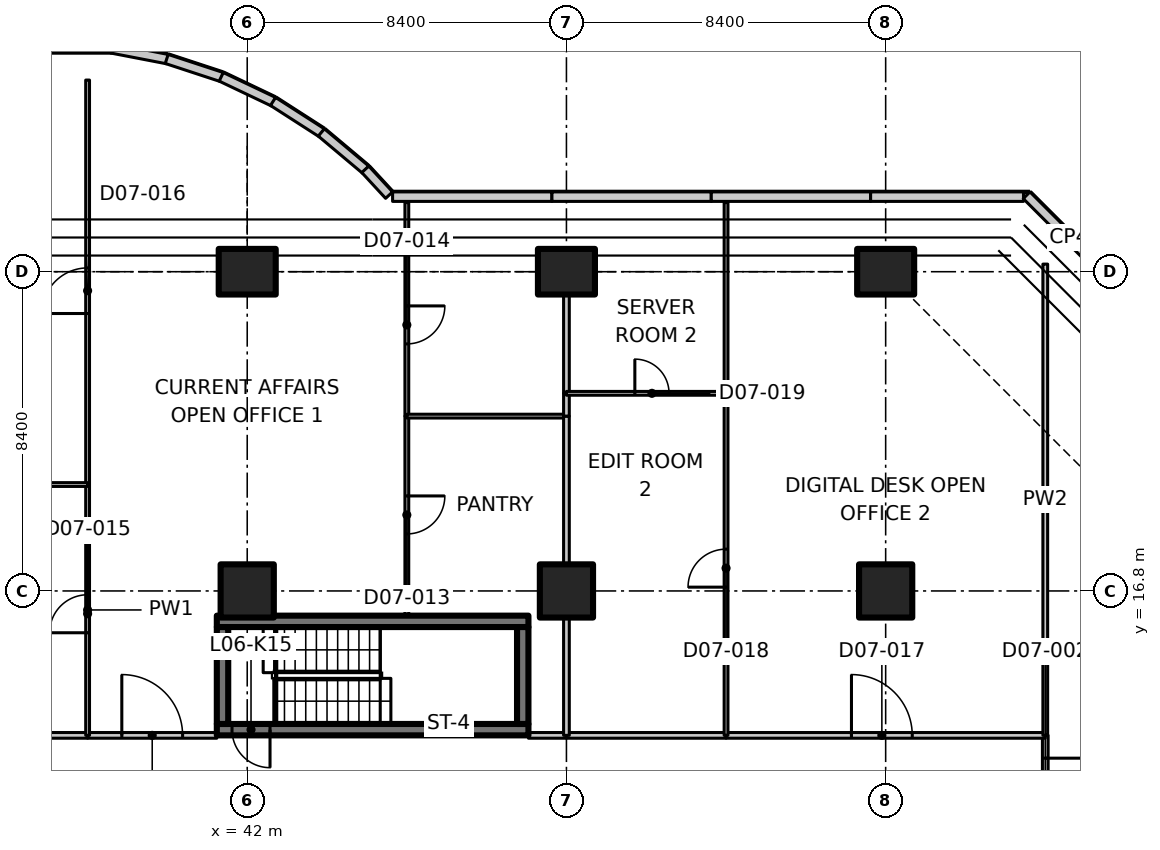
"""IFC4 building model, lengths in metres.
Left out: names, types, materials, properties, quantities, classifications, styles, units other than length and angle.
Written with IfcOpenShell. Run it as: python <this file> out.ifc"""

import sys

from ifc_helpers import new_model, si_unit, direction, frame, frame_2d, origin, origin_2d, place, context, subcontext, project, spatial, polyline, rectangle, outline, extrude, element, fill, save


model = new_model("IFC4")
c1 = context("Model", 3, precision=1e-05, world=origin(), true_north=direction((0.0, 1.0)))
c2 = subcontext(c1, "Body", "Model", "MODEL_VIEW")
j1 = project(units=[si_unit("LENGTHUNIT", "METRE"), si_unit("PLANEANGLEUNIT", "RADIAN")], contexts=[c1])
p1 = place(None, origin())
s1 = spatial("IfcSite", under=j1, at=p1, CompositionType="ELEMENT")
p2 = place(p1, origin())
s2 = spatial("IfcBuilding", under=s1, at=p2, CompositionType="ELEMENT")
p3 = place(p2, frame((0.0, 0.0, 36.5)))
s3 = spatial("IfcBuildingStorey", under=s2, at=p3, CompositionType="ELEMENT", Elevation=36.5)
p4 = place(p3, frame((42.0, 16.8, 0.0), z_axis=(0.0, 0.0, 1.0), x_axis=(1.0, 0.0, 0.0)))
e1 = element("IfcColumn", 1, at=p4, inside=s3, PredefinedType="COLUMN", context=c2, shape_type="SweptSolid", body=[
    extrude(rectangle(XDim=1.4, YDim=1.4, at=origin_2d()), origin(), (0.0, 0.0, 1.0), 3.35),
])
p5 = place(p3, frame((42.0, 25.2, 0.0), z_axis=(0.0, 0.0, 1.0), x_axis=(0.0, 1.0, 0.0)))
e2 = element("IfcColumn", 2, at=p5, inside=s3, PredefinedType="COLUMN", context=c2, shape_type="SweptSolid", body=[
    extrude(rectangle(XDim=1.2, YDim=1.5, at=origin_2d()), origin(), (0.0, 0.0, 1.0), 3.35),
])
p6 = place(p3, frame((50.4, 16.8, 0.0), z_axis=(0.0, 0.0, 1.0), x_axis=(1.0, 0.0, 0.0)))
e3 = element("IfcColumn", 3, at=p6, inside=s3, PredefinedType="COLUMN", context=c2, shape_type="SweptSolid", body=[
    extrude(rectangle(XDim=1.4, YDim=1.4, at=origin_2d()), origin(), (0.0, 0.0, 1.0), 3.35),
])
p7 = place(p3, frame((50.4, 25.2, 0.0), z_axis=(0.0, 0.0, 1.0), x_axis=(0.0, 1.0, 0.0)))
e4 = element("IfcColumn", 4, at=p7, inside=s3, PredefinedType="COLUMN", context=c2, shape_type="SweptSolid", body=[
    extrude(rectangle(XDim=1.2, YDim=1.5, at=origin_2d()), origin(), (0.0, 0.0, 1.0), 3.35),
])
p8 = place(p3, frame((58.8, 16.8, 0.0), z_axis=(0.0, 0.0, 1.0), x_axis=(1.0, 0.0, 0.0)))
e5 = element("IfcColumn", 5, at=p8, inside=s3, PredefinedType="COLUMN", context=c2, shape_type="SweptSolid", body=[
    extrude(rectangle(XDim=1.4, YDim=1.4, at=origin_2d()), origin(), (0.0, 0.0, 1.0), 3.35),
])
p9 = place(p3, frame((58.8, 25.2, 0.0), z_axis=(0.0, 0.0, 1.0), x_axis=(0.0, 1.0, 0.0)))
e6 = element("IfcColumn", 6, at=p9, inside=s3, PredefinedType="COLUMN", context=c2, shape_type="SweptSolid", body=[
    extrude(rectangle(XDim=1.2, YDim=1.5, at=origin_2d()), origin(), (0.0, 0.0, 1.0), 3.35),
])
p10 = place(p3, frame((35.348, 31.075, 0.0), z_axis=(0.0, 0.0, 1.0), x_axis=(1.0, 0.0, 0.0)))
e7 = element("IfcWall", 7, at=p10, inside=s3, PredefinedType="PARAPET", context=c2, shape_type="SweptSolid", body=[
    extrude(rectangle(XDim=3.103, YDim=0.25, at=frame_2d((1.552, 0.0))), origin(), (0.0, 0.0, 1.0), 1.1),
])
p11 = place(p3, frame((38.428, 31.077, 0.0), z_axis=(0.0, 0.0, 1.0), x_axis=(0.981913193778, -0.189331666354, 0.0)))
e8 = element("IfcWall", 8, at=p11, inside=s3, PredefinedType="PARAPET", context=c2, shape_type="SweptSolid", body=[
    extrude(rectangle(XDim=1.496, YDim=0.25, at=frame_2d((0.748, 0.0))), origin(), (0.0, 0.0, 1.0), 1.1),
])
for number, where, z_axis, x_axis in (
    (9, (39.881, 30.798, 0.0), (0.0, 0.0, 1.0), (0.95, -0.312, 0.0)),
    (10, (41.316, 30.328, 0.0), (0.0, 0.0, 1.0), (0.903, -0.43, 0.0)),
    (11, (42.679, 29.68, 0.0), (0.0, 0.0, 1.0), (0.841, -0.541, 0.0)),
    (12, (43.95, 28.864, 0.0), (0.0, 0.0, 1.0), (0.766, -0.643, 0.0)),
):
    element("IfcWall", number, at=place(p3, frame(where, z_axis=z_axis, x_axis=x_axis)), inside=s3, PredefinedType="PARAPET", context=c2, shape_type="SweptSolid", body=[
        extrude(rectangle(XDim=1.526, YDim=0.25, at=frame_2d((0.763, 0.0))), origin(), (0.0, 0.0, 1.0), 1.1),
    ])
p12 = place(p3, frame((45.107, 27.894, 0.0), z_axis=(0.0, 0.0, 1.0), x_axis=(0.678126420741, -0.734945275168, 0.0)))
e13 = element("IfcWall", 13, at=p12, inside=s3, PredefinedType="PARAPET", context=c2, shape_type="SweptSolid", body=[
    extrude(rectangle(XDim=0.924, YDim=0.25, at=frame_2d((0.462, 0.0))), origin(), (0.0, 0.0, 1.0), 1.1),
])
for number, where, z_axis, x_axis in (
    (14, (45.825, 27.175, 0.0), (0.0, 0.0, 1.0), (1.0, 0.0, 0.0)),
    (15, (50.018, 27.175, 0.0), (0.0, 0.0, 1.0), (1.0, 0.0, 0.0)),
    (16, (54.211, 27.175, 0.0), (0.0, 0.0, 1.0), (1.0, 0.0, 0.0)),
):
    element("IfcWall", number, at=place(p3, frame(where, z_axis=z_axis, x_axis=x_axis)), inside=s3, PredefinedType="PARAPET", context=c2, shape_type="SweptSolid", body=[
        extrude(rectangle(XDim=4.193, YDim=0.25, at=frame_2d((2.096, 0.0))), origin(), (0.0, 0.0, 1.0), 1.1),
    ])
p13 = place(p3, frame((58.404, 27.175, 0.0), z_axis=(0.0, 0.0, 1.0), x_axis=(1.0, 0.0, 0.0)))
e17 = element("IfcWall", 17, at=p13, inside=s3, PredefinedType="PARAPET", context=c2, shape_type="SweptSolid", body=[
    extrude(rectangle(XDim=4.023, YDim=0.25, at=frame_2d((2.011, 0.0))), origin(), (0.0, 0.0, 1.0), 1.1),
])
p14 = place(p3, frame((62.509, 27.212, 0.0), z_axis=(0.0, 0.0, 1.0), x_axis=(0.70706814675, -0.707145413513, 0.0)))
e18 = element("IfcWall", 18, at=p14, inside=s3, PredefinedType="PARAPET", context=c2, shape_type="SweptSolid", body=[
    extrude(rectangle(XDim=3.16, YDim=0.25, at=frame_2d((1.58, 0.0))), origin(), (0.0, 0.0, 1.0), 1.1),
])
p15 = place(p3, frame((49.4, 13.15, 0.0), z_axis=(0.0, 0.0, 1.0), x_axis=(-1.0, 0.0, 0.0)))
e19 = element("IfcWall", 19, at=p15, inside=s3, PredefinedType="SHEAR", context=c2, shape_type="SweptSolid", body=[
    extrude(rectangle(XDim=8.2, YDim=0.3, at=frame_2d((4.1, 0.0))), origin(), (0.0, 0.0, 1.0), 3.35),
])
p16 = place(p15, frame((6.8, 0.0, 0.0)))
e20 = element("IfcOpeningElement", 20, at=p16, cuts=e19, PredefinedType="OPENING", context=c2, shape_type="SweptSolid", body=[
    extrude(rectangle(XDim=1.0, YDim=2.1, at=frame_2d((0.5, 1.05))), frame((0.0, 0.16, 0.0), z_axis=(0.0, -1.0, 0.0), x_axis=(1.0, 0.0, 0.0)), (0.0, 0.0, 1.0), 0.32),
])
p17 = place(p3, frame((41.2, 16.0, 0.0), z_axis=(0.0, 0.0, 1.0), x_axis=(1.0, 0.0, 0.0)))
e21 = element("IfcWall", 21, at=p17, inside=s3, PredefinedType="SHEAR", context=c2, shape_type="SweptSolid", body=[
    extrude(rectangle(XDim=8.2, YDim=0.3, at=frame_2d((4.1, 0.0))), origin(), (0.0, 0.0, 1.0), 3.35),
])
for number, where, z_axis, x_axis in (
    (22, (41.35, 13.3, 0.0), (0.0, 0.0, 1.0), (0.0, 1.0, 0.0)),
    (23, (49.25, 13.3, 0.0), (0.0, 0.0, 1.0), (0.0, 1.0, 0.0)),
):
    element("IfcWall", number, at=place(p3, frame(where, z_axis=z_axis, x_axis=x_axis)), inside=s3, PredefinedType="SHEAR", context=c2, shape_type="SweptSolid", body=[
        extrude(rectangle(XDim=2.55, YDim=0.3, at=frame_2d((1.275, 0.0))), origin(), (0.0, 0.0, 1.0), 3.35),
    ])
p18 = place(p3, frame((63.0, 13.0, 0.0), z_axis=(0.0, 0.0, 1.0), x_axis=(0.0, -1.0, 0.0)))
e24 = element("IfcWall", 24, at=p18, inside=s3, PredefinedType="PARTITIONING", context=c2, shape_type="SweptSolid", body=[
    extrude(rectangle(XDim=3.4, YDim=0.15, at=frame_2d((1.7, 0.0))), origin(), (0.0, 0.0, 1.0), 3.33),
])
p19 = place(p18, frame((0.6, 0.0, 0.0)))
e25 = element("IfcOpeningElement", 25, at=p19, cuts=e24, PredefinedType="OPENING", context=c2, shape_type="SweptSolid", body=[
    extrude(rectangle(XDim=2.0, YDim=2.4, at=frame_2d((1.0, 1.2))), frame((0.0, 0.085, 0.0), z_axis=(0.0, -1.0, 0.0), x_axis=(1.0, 0.0, 0.0)), (0.0, 0.0, 1.0), 0.17),
])
p20 = place(p3, frame((37.8, 13.0, 0.0), z_axis=(0.0, 0.0, 1.0), x_axis=(1.0, 0.0, 0.0)))
e26 = element("IfcWall", 26, at=p20, inside=s3, PredefinedType="PARTITIONING", context=c2, shape_type="SweptSolid", body=[
    extrude(rectangle(XDim=3.4, YDim=0.15, at=frame_2d((1.7, 0.0))), origin(), (0.0, 0.0, 1.0), 3.33),
])
p21 = place(p20, frame((0.9, 0.0, 0.0)))
e27 = element("IfcOpeningElement", 27, at=p21, cuts=e26, PredefinedType="OPENING", context=c2, shape_type="SweptSolid", body=[
    extrude(rectangle(XDim=1.6, YDim=2.1, at=frame_2d((0.8, 1.05))), frame((0.0, 0.085, 0.0), z_axis=(0.0, -1.0, 0.0), x_axis=(1.0, 0.0, 0.0)), (0.0, 0.0, 1.0), 0.17),
])
p22 = place(p3, frame((49.4, 13.0, 0.0), z_axis=(0.0, 0.0, 1.0), x_axis=(1.0, 0.0, 0.0)))
e28 = element("IfcWall", 28, at=p22, inside=s3, PredefinedType="PARTITIONING", context=c2, shape_type="SweptSolid", body=[
    extrude(rectangle(XDim=1.0, YDim=0.15, at=frame_2d((0.5, 0.0))), origin(), (0.0, 0.0, 1.0), 3.33),
])
p23 = place(p3, frame((33.6, 13.0, 0.0), z_axis=(0.0, 0.0, 1.0), x_axis=(1.0, 0.0, 0.0)))
e29 = element("IfcWall", 29, at=p23, inside=s3, PredefinedType="PARTITIONING", context=c2, shape_type="SweptSolid", body=[
    extrude(rectangle(XDim=4.2, YDim=0.15, at=frame_2d((2.1, 0.0))), origin(), (0.0, 0.0, 1.0), 3.33),
])
p24 = place(p3, frame((54.6, 13.0, 0.0), z_axis=(0.0, 0.0, 1.0), x_axis=(1.0, 0.0, 0.0)))
e30 = element("IfcWall", 30, at=p24, inside=s3, PredefinedType="PARTITIONING", context=c2, shape_type="SweptSolid", body=[
    extrude(rectangle(XDim=8.4, YDim=0.15, at=frame_2d((4.2, 0.0))), origin(), (0.0, 0.0, 1.0), 3.33),
])
p25 = place(p24, frame((3.3, 0.0, 0.0)))
e31 = element("IfcOpeningElement", 31, at=p25, cuts=e30, PredefinedType="OPENING", context=c2, shape_type="SweptSolid", body=[
    extrude(rectangle(XDim=1.6, YDim=2.1, at=frame_2d((0.8, 1.05))), frame((0.0, 0.085, 0.0), z_axis=(0.0, -1.0, 0.0), x_axis=(1.0, 0.0, 0.0)), (0.0, 0.0, 1.0), 0.17),
])
p26 = place(p3, frame((50.4, 13.0, 0.0), z_axis=(0.0, 0.0, 1.0), x_axis=(1.0, 0.0, 0.0)))
e32 = element("IfcWall", 32, at=p26, inside=s3, PredefinedType="PARTITIONING", context=c2, shape_type="SweptSolid", body=[
    extrude(rectangle(XDim=4.2, YDim=0.15, at=frame_2d((2.1, 0.0))), origin(), (0.0, 0.0, 1.0), 3.33),
])
p27 = place(p3, frame((63.0, 13.0, 0.0), z_axis=(0.0, 0.0, 1.0), x_axis=(0.0, 1.0, 0.0)))
e33 = element("IfcWall", 33, at=p27, inside=s3, PredefinedType="PARTITIONING", context=c2, shape_type="SweptSolid", body=[
    extrude(outline(polyline([(0.0, 0.0), (12.4, 0.0), (12.4, 3.33), (8.678, 3.33), (8.676, 2.98), (7.324, 2.98), (7.322, 3.33), (0.0, 3.33), (0.0, 0.0)])), frame((0.0, 0.062, 0.0), z_axis=(0.0, -1.0, 0.0), x_axis=(1.0, 0.0, 0.0)), (0.0, 0.0, 1.0), 0.125),
])
p28 = place(p3, frame((46.2, 21.4, 0.0), z_axis=(0.0, 0.0, 1.0), x_axis=(0.0, -1.0, 0.0)))
e34 = element("IfcWall", 34, at=p28, inside=s3, PredefinedType="PARTITIONING", context=c2, shape_type="SweptSolid", body=[
    extrude(rectangle(XDim=5.25, YDim=0.1, at=frame_2d((2.625, 0.0))), origin(), (0.0, 0.0, 1.0), 3.33),
])
p29 = place(p28, frame((2.1, 0.0, 0.0)))
e35 = element("IfcOpeningElement", 35, at=p29, cuts=e34, PredefinedType="OPENING", context=c2, shape_type="SweptSolid", body=[
    extrude(rectangle(XDim=1.0, YDim=2.1, at=frame_2d((0.5, 1.05))), frame((0.0, 0.06, 0.0), z_axis=(0.0, -1.0, 0.0), x_axis=(1.0, 0.0, 0.0)), (0.0, 0.0, 1.0), 0.12),
])
p30 = place(p3, frame((46.2, 27.02, 0.0), z_axis=(0.0, 0.0, 1.0), x_axis=(0.0, -1.0, 0.0)))
e36 = element("IfcWall", 36, at=p30, inside=s3, PredefinedType="PARTITIONING", context=c2, shape_type="SweptSolid", body=[
    extrude(outline(polyline([(0.0, 0.0), (5.62, 0.0), (5.62, 3.33), (2.27, 3.33), (2.268, 2.98), (1.372, 2.98), (1.37, 3.33), (0.72, 3.33), (0.0, 3.33), (0.0, 0.0)])), frame((0.0, 0.05, 0.0), z_axis=(0.0, -1.0, 0.0), x_axis=(1.0, 0.0, 0.0)), (0.0, 0.0, 1.0), 0.1),
])
p31 = place(p30, frame((2.72, 0.0, 0.0)))
e37 = element("IfcOpeningElement", 37, at=p31, cuts=e36, PredefinedType="OPENING", context=c2, shape_type="SweptSolid", body=[
    extrude(rectangle(XDim=1.0, YDim=2.1, at=frame_2d((0.5, 1.05))), frame((0.0, 0.06, 0.0), z_axis=(0.0, -1.0, 0.0), x_axis=(1.0, 0.0, 0.0)), (0.0, 0.0, 1.0), 0.12),
])
p32 = place(p3, frame((37.8, 13.0, 0.0), z_axis=(0.0, 0.0, 1.0), x_axis=(0.0, 1.0, 0.0)))
e38 = element("IfcWall", 38, at=p32, inside=s3, PredefinedType="PARTITIONING", context=c2, shape_type="SweptSolid", body=[
    extrude(rectangle(XDim=6.6, YDim=0.1, at=frame_2d((3.3, 0.0))), origin(), (0.0, 0.0, 1.0), 3.33),
])
p33 = place(p32, frame((2.7, 0.0, 0.0)))
e39 = element("IfcOpeningElement", 39, at=p33, cuts=e38, PredefinedType="OPENING", context=c2, shape_type="SweptSolid", body=[
    extrude(rectangle(XDim=1.0, YDim=2.1, at=frame_2d((0.5, 1.05))), frame((0.0, 0.06, 0.0), z_axis=(0.0, -1.0, 0.0), x_axis=(1.0, 0.0, 0.0)), (0.0, 0.0, 1.0), 0.12),
])
p34 = place(p3, frame((37.8, 19.6, 0.0), z_axis=(0.0, 0.0, 1.0), x_axis=(0.0, 1.0, 0.0)))
e40 = element("IfcWall", 40, at=p34, inside=s3, PredefinedType="PARTITIONING", context=c2, shape_type="SweptSolid", body=[
    extrude(outline(polyline([(0.0, 0.0), (10.643, 0.0), (10.643, 3.33), (6.05, 3.33), (6.048, 2.98), (5.152, 2.98), (5.15, 3.33), (0.0, 3.33), (0.0, 0.0)])), frame((0.0, 0.05, 0.0), z_axis=(0.0, -1.0, 0.0), x_axis=(1.0, 0.0, 0.0)), (0.0, 0.0, 1.0), 0.1),
])
p35 = place(p34, frame((4.5, 0.0, 0.0)))
e41 = element("IfcOpeningElement", 41, at=p35, cuts=e40, PredefinedType="OPENING", context=c2, shape_type="SweptSolid", body=[
    extrude(rectangle(XDim=1.2, YDim=2.1, at=frame_2d((0.6, 1.05))), frame((0.0, 0.06, 0.0), z_axis=(0.0, -1.0, 0.0), x_axis=(1.0, 0.0, 0.0)), (0.0, 0.0, 1.0), 0.12),
])
p36 = place(p3, frame((46.2, 21.4, 0.0), z_axis=(0.0, 0.0, 1.0), x_axis=(1.0, 0.0, 0.0)))
e42 = element("IfcWall", 42, at=p36, inside=s3, PredefinedType="PARTITIONING", context=c2, shape_type="SweptSolid", body=[
    extrude(rectangle(XDim=4.2, YDim=0.1, at=frame_2d((2.1, 0.0))), origin(), (0.0, 0.0, 1.0), 3.33),
])
p37 = place(p3, frame((50.4, 21.4, 0.0), z_axis=(0.0, 0.0, 1.0), x_axis=(0.0, -1.0, 0.0)))
e43 = element("IfcWall", 43, at=p37, inside=s3, PredefinedType="PARTITIONING", context=c2, shape_type="SweptSolid", body=[
    extrude(rectangle(XDim=3.88, YDim=0.15, at=frame_2d((1.94, 0.0))), origin(), (0.0, 0.0, 1.0), 3.33),
])
p38 = place(p3, frame((50.4, 16.08, 0.0), z_axis=(0.0, 0.0, 1.0), x_axis=(0.0, -1.0, 0.0)))
e44 = element("IfcWall", 44, at=p38, inside=s3, PredefinedType="PARTITIONING", context=c2, shape_type="SweptSolid", body=[
    extrude(rectangle(XDim=3.08, YDim=0.15, at=frame_2d((1.54, 0.0))), origin(), (0.0, 0.0, 1.0), 3.33),
])
p39 = place(p3, frame((50.4, 22.0, 0.0), z_axis=(0.0, 0.0, 1.0), x_axis=(0.0, -1.0, 0.0)))
e45 = element("IfcWall", 45, at=p39, inside=s3, PredefinedType="PARTITIONING", context=c2, shape_type="SweptSolid", body=[
    extrude(rectangle(XDim=0.6, YDim=0.15, at=frame_2d((0.3, 0.0))), origin(), (0.0, 0.0, 1.0), 3.33),
])
p40 = place(p3, frame((50.4, 24.58, 0.0), z_axis=(0.0, 0.0, 1.0), x_axis=(0.0, -1.0, 0.0)))
e46 = element("IfcWall", 46, at=p40, inside=s3, PredefinedType="PARTITIONING", context=c2, shape_type="SweptSolid", body=[
    extrude(rectangle(XDim=2.58, YDim=0.15, at=frame_2d((1.29, 0.0))), origin(), (0.0, 0.0, 1.0), 3.33),
])
p41 = place(p3, frame((33.6, 19.6, 0.0), z_axis=(0.0, 0.0, 1.0), x_axis=(1.0, 0.0, 0.0)))
e47 = element("IfcWall", 47, at=p41, inside=s3, PredefinedType="PARTITIONING", context=c2, shape_type="SweptSolid", body=[
    extrude(rectangle(XDim=4.2, YDim=0.1, at=frame_2d((2.1, 0.0))), origin(), (0.0, 0.0, 1.0), 3.33),
])
p42 = place(p3, frame((54.6, 13.0, 0.0), z_axis=(0.0, 0.0, 1.0), x_axis=(0.0, 1.0, 0.0)))
e48 = element("IfcWall", 48, at=p42, inside=s3, PredefinedType="PARTITIONING", context=c2, shape_type="SweptSolid", body=[
    extrude(rectangle(XDim=9.0, YDim=0.1, at=frame_2d((4.5, 0.0))), origin(), (0.0, 0.0, 1.0), 3.33),
])
p43 = place(p42, frame((3.9, 0.0, 0.0)))
e49 = element("IfcOpeningElement", 49, at=p43, cuts=e48, PredefinedType="OPENING", context=c2, shape_type="SweptSolid", body=[
    extrude(rectangle(XDim=1.0, YDim=2.1, at=frame_2d((0.5, 1.05))), frame((0.0, 0.06, 0.0), z_axis=(0.0, -1.0, 0.0), x_axis=(1.0, 0.0, 0.0)), (0.0, 0.0, 1.0), 0.12),
])
p44 = place(p3, frame((54.6, 22.0, 0.0), z_axis=(0.0, 0.0, 1.0), x_axis=(0.0, 1.0, 0.0)))
e50 = element("IfcWall", 50, at=p44, inside=s3, PredefinedType="PARTITIONING", context=c2, shape_type="SweptSolid", body=[
    extrude(rectangle(XDim=5.02, YDim=0.1, at=frame_2d((2.51, 0.0))), origin(), (0.0, 0.0, 1.0), 2.98),
])
p45 = place(p3, frame((50.4, 22.0, 0.0), z_axis=(0.0, 0.0, 1.0), x_axis=(1.0, 0.0, 0.0)))
e51 = element("IfcWall", 51, at=p45, inside=s3, PredefinedType="PARTITIONING", context=c2, shape_type="SweptSolid", body=[
    extrude(rectangle(XDim=4.2, YDim=0.1, at=frame_2d((2.1, 0.0))), origin(), (0.0, 0.0, 1.0), 3.33),
])
p46 = place(p45, frame((1.8, 0.0, 0.0)))
e52 = element("IfcOpeningElement", 52, at=p46, cuts=e51, PredefinedType="OPENING", context=c2, shape_type="SweptSolid", body=[
    extrude(rectangle(XDim=0.9, YDim=2.1, at=frame_2d((0.45, 1.05))), frame((0.0, 0.06, 0.0), z_axis=(0.0, -1.0, 0.0), x_axis=(1.0, 0.0, 0.0)), (0.0, 0.0, 1.0), 0.12),
])
p47 = place(p16, origin())
e53 = element("IfcDoor", 53, at=p47, inside=s3, OperationType="SINGLE_SWING_LEFT", PredefinedType="DOOR", context=c2, shape_type="SweptSolid", body=[
    extrude(rectangle(XDim=1.0, YDim=2.1, at=frame_2d((0.5, 1.05))), frame((0.0, 0.025, 0.0), z_axis=(0.0, -1.0, 0.0), x_axis=(1.0, 0.0, 0.0)), (0.0, 0.0, 1.0), 0.05),
])
fill(e20, e53)
p48 = place(p19, origin())
e54 = element("IfcDoor", 54, at=p48, inside=s3, OperationType="DOUBLE_DOOR_SINGLE_SWING", PredefinedType="DOOR", context=c2, shape_type="SweptSolid", body=[
    extrude(rectangle(XDim=2.0, YDim=2.4, at=frame_2d((1.0, 1.2))), frame((0.0, 0.025, 0.0), z_axis=(0.0, -1.0, 0.0), x_axis=(1.0, 0.0, 0.0)), (0.0, 0.0, 1.0), 0.05),
])
fill(e25, e54)
p49 = place(p21, origin())
e55 = element("IfcDoor", 55, at=p49, inside=s3, OperationType="DOUBLE_DOOR_SINGLE_SWING", PredefinedType="DOOR", context=c2, shape_type="SweptSolid", body=[
    extrude(rectangle(XDim=1.6, YDim=2.1, at=frame_2d((0.8, 1.05))), frame((0.0, 0.025, 0.0), z_axis=(0.0, -1.0, 0.0), x_axis=(1.0, 0.0, 0.0)), (0.0, 0.0, 1.0), 0.05),
])
fill(e27, e55)
p50 = place(p29, origin())
e56 = element("IfcDoor", 56, at=p50, inside=s3, OperationType="SINGLE_SWING_LEFT", PredefinedType="DOOR", context=c2, shape_type="SweptSolid", body=[
    extrude(rectangle(XDim=1.0, YDim=2.1, at=frame_2d((0.5, 1.05))), frame((0.0, 0.025, 0.0), z_axis=(0.0, -1.0, 0.0), x_axis=(1.0, 0.0, 0.0)), (0.0, 0.0, 1.0), 0.05),
])
fill(e35, e56)
p51 = place(p31, origin())
e57 = element("IfcDoor", 57, at=p51, inside=s3, OperationType="SINGLE_SWING_LEFT", PredefinedType="DOOR", context=c2, shape_type="SweptSolid", body=[
    extrude(rectangle(XDim=1.0, YDim=2.1, at=frame_2d((0.5, 1.05))), frame((0.0, 0.025, 0.0), z_axis=(0.0, -1.0, 0.0), x_axis=(1.0, 0.0, 0.0)), (0.0, 0.0, 1.0), 0.05),
])
fill(e37, e57)
p52 = place(p33, origin())
e58 = element("IfcDoor", 58, at=p52, inside=s3, OperationType="SINGLE_SWING_LEFT", PredefinedType="DOOR", context=c2, shape_type="SweptSolid", body=[
    extrude(rectangle(XDim=1.0, YDim=2.1, at=frame_2d((0.5, 1.05))), frame((0.0, 0.025, 0.0), z_axis=(0.0, -1.0, 0.0), x_axis=(1.0, 0.0, 0.0)), (0.0, 0.0, 1.0), 0.05),
])
fill(e39, e58)
p53 = place(p35, origin())
e59 = element("IfcDoor", 59, at=p53, inside=s3, OperationType="SINGLE_SWING_LEFT", PredefinedType="DOOR", context=c2, shape_type="SweptSolid", body=[
    extrude(rectangle(XDim=1.2, YDim=2.1, at=frame_2d((0.6, 1.05))), frame((0.0, 0.025, 0.0), z_axis=(0.0, -1.0, 0.0), x_axis=(1.0, 0.0, 0.0)), (0.0, 0.0, 1.0), 0.05),
])
fill(e41, e59)
p54 = place(p25, origin())
e60 = element("IfcDoor", 60, at=p54, inside=s3, OperationType="DOUBLE_DOOR_SINGLE_SWING", PredefinedType="DOOR", context=c2, shape_type="SweptSolid", body=[
    extrude(rectangle(XDim=1.6, YDim=2.1, at=frame_2d((0.8, 1.05))), frame((0.0, 0.025, 0.0), z_axis=(0.0, -1.0, 0.0), x_axis=(1.0, 0.0, 0.0)), (0.0, 0.0, 1.0), 0.05),
])
fill(e31, e60)
p55 = place(p43, origin())
e61 = element("IfcDoor", 61, at=p55, inside=s3, OperationType="SINGLE_SWING_LEFT", PredefinedType="DOOR", context=c2, shape_type="SweptSolid", body=[
    extrude(rectangle(XDim=1.0, YDim=2.1, at=frame_2d((0.5, 1.05))), frame((0.0, 0.025, 0.0), z_axis=(0.0, -1.0, 0.0), x_axis=(1.0, 0.0, 0.0)), (0.0, 0.0, 1.0), 0.05),
])
fill(e49, e61)
p56 = place(p46, origin())
e62 = element("IfcDoor", 62, at=p56, inside=s3, OperationType="SINGLE_SWING_LEFT", PredefinedType="DOOR", context=c2, shape_type="SweptSolid", body=[
    extrude(rectangle(XDim=0.9, YDim=2.1, at=frame_2d((0.45, 1.05))), frame((0.0, 0.025, 0.0), z_axis=(0.0, -1.0, 0.0), x_axis=(1.0, 0.0, 0.0)), (0.0, 0.0, 1.0), 0.05),
])
fill(e52, e62)
save(model, sys.argv[1])
